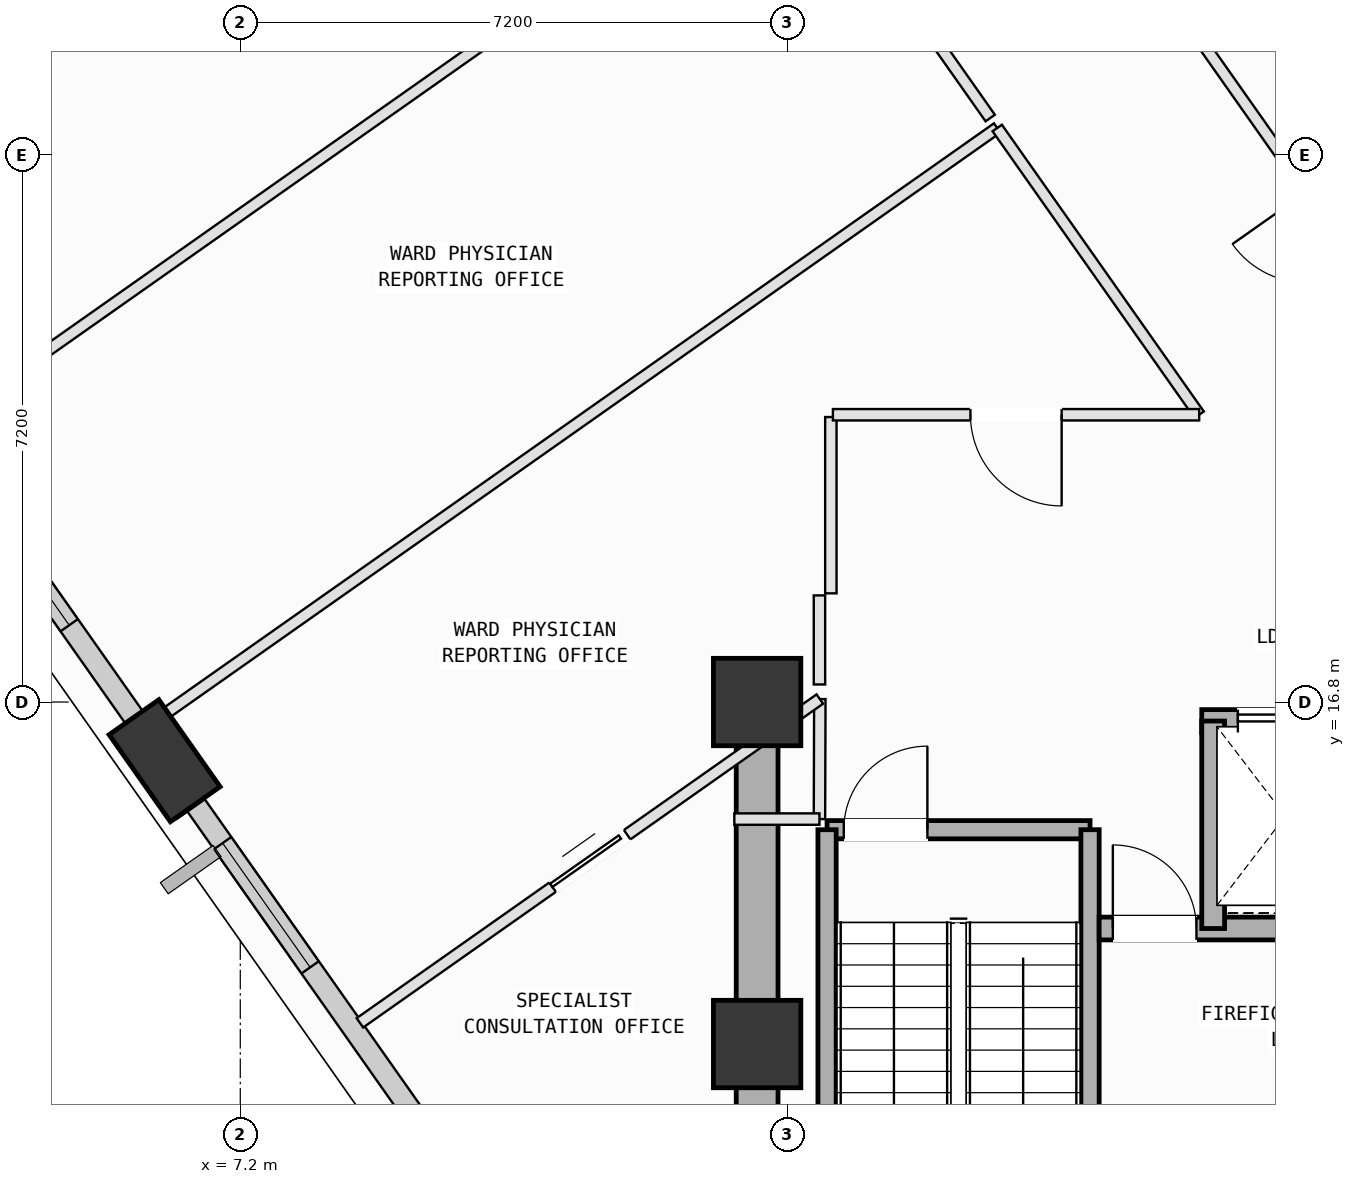
"""IFC4 building model, lengths in metres.
Left out: names, types, materials, properties, quantities, classifications, styles, units other than length and angle.
Written with IfcOpenShell. Run it as: python <this file> out.ifc"""

import sys

from ifc_helpers import new_model, si_unit, direction, frame, frame_2d, origin, origin_2d, place, context, subcontext, project, spatial, rectangle, extrude, element, fill, save


model = new_model("IFC4")
c1 = context("Model", 3, precision=1e-05, world=origin(), true_north=direction((0.0, 1.0)))
c2 = subcontext(c1, "Body", "Model", "MODEL_VIEW")
j1 = project(units=[si_unit("LENGTHUNIT", "METRE"), si_unit("PLANEANGLEUNIT", "RADIAN")], contexts=[c1])
p1 = place(None, origin())
s1 = spatial("IfcSite", under=j1, at=p1, CompositionType="ELEMENT")
p2 = place(p1, origin())
s2 = spatial("IfcBuilding", under=s1, at=p2, CompositionType="ELEMENT")
p3 = place(p2, frame((0.0, 0.0, 173.8)))
s3 = spatial("IfcBuildingStorey", under=s2, at=p3, CompositionType="ELEMENT", Elevation=173.8)
for number, where, z_axis, x_axis in (
    (1, (14.0, 12.3, 0.0), (0.0, 0.0, 1.0), (1.0, 0.0, 0.0)),
    (2, (14.0, 16.8, 0.0), (0.0, 0.0, 1.0), (1.0, 0.0, 0.0)),
):
    element("IfcColumn", number, at=place(p3, frame(where, z_axis=z_axis, x_axis=x_axis)), inside=s3, PredefinedType="COLUMN", context=c2, shape_type="SweptSolid", body=[
        extrude(rectangle(XDim=1.15, YDim=1.15, at=origin_2d()), origin(), (0.0, 0.0, 1.0), 4.0),
    ])
p4 = place(p3, frame((6.204, 16.028, 0.002), z_axis=(0.037064026692, -0.112465966428, 0.992964080076), x_axis=(-0.800913109409, 0.590900661619, 0.096822514295)))
e3 = element("IfcColumn", 3, at=p4, inside=s3, PredefinedType="COLUMN", context=c2, shape_type="SweptSolid", body=[
    extrude(rectangle(XDim=1.4, YDim=0.8, at=origin_2d()), origin(), (0.0, 0.0, 1.0), 4.025),
])
p5 = place(p3, frame((6.053, 16.243, 0.0), z_axis=(0.0, 0.0, 1.0), x_axis=(-0.575713674911, 0.817651371014, 0.0)))
e4 = element("IfcWall", 4, at=p5, inside=s3, PredefinedType="SOLIDWALL", context=c2, shape_type="SweptSolid", body=[
    extrude(rectangle(XDim=5.628, YDim=0.28, at=frame_2d((2.814, 0.0))), origin(), (0.0, 0.0, 1.0), 3.265),
])
p6 = place(p5, frame((1.917, 0.0, 0.75)))
e5 = element("IfcOpeningElement", 5, at=p6, cuts=e4, PredefinedType="OPENING", context=c2, shape_type="SweptSolid", body=[
    extrude(rectangle(XDim=1.6, YDim=1.95, at=frame_2d((0.8, 0.975))), frame((0.0, 0.15, 0.0), z_axis=(0.0, -1.0, 0.0), x_axis=(1.0, 0.0, 0.0)), (0.0, 0.0, 1.0), 0.3),
])
p7 = place(p3, frame((9.878, 10.81, 0.0), z_axis=(0.0, 0.0, 1.0), x_axis=(-0.575714474807, 0.817650807801, 0.0)))
e6 = element("IfcWall", 6, at=p7, inside=s3, PredefinedType="SOLIDWALL", context=c2, shape_type="SweptSolid", body=[
    extrude(rectangle(XDim=5.662, YDim=0.28, at=frame_2d((2.831, 0.0))), origin(), (0.0, 0.0, 1.0), 3.265),
])
p8 = place(p7, frame((3.056, 0.0, 0.75)))
e7 = element("IfcOpeningElement", 7, at=p8, cuts=e6, PredefinedType="OPENING", context=c2, shape_type="SweptSolid", body=[
    extrude(rectangle(XDim=2.0, YDim=1.95, at=frame_2d((1.0, 0.975))), frame((0.0, 0.15, 0.0), z_axis=(0.0, -1.0, 0.0), x_axis=(1.0, 0.0, 0.0)), (0.0, 0.0, 1.0), 0.3),
])
p9 = place(p3, frame((14.92, 15.12, 0.0), z_axis=(0.0, 0.0, 1.0), x_axis=(1.0, 0.0, 0.0)))
e8 = element("IfcWall", 8, at=p9, inside=s3, PredefinedType="SOLIDWALL", context=c2, shape_type="SweptSolid", body=[
    extrude(rectangle(XDim=3.46, YDim=0.24, at=frame_2d((1.73, 0.0))), origin(), (0.0, 0.0, 1.0), 3.78),
])
p10 = place(p9, frame((0.22, 0.0, 0.0)))
e9 = element("IfcOpeningElement", 9, at=p10, cuts=e8, PredefinedType="OPENING", context=c2, shape_type="SweptSolid", body=[
    extrude(rectangle(XDim=1.1, YDim=2.15, at=frame_2d((0.55, 1.075))), frame((0.0, 0.13, 0.0), z_axis=(0.0, -1.0, 0.0), x_axis=(1.0, 0.0, 0.0)), (0.0, 0.0, 1.0), 0.26),
])
for number, where, z_axis, x_axis in (
    (10, (18.38, 15.12, 0.0), (0.0, 0.0, 1.0), (0.0, -1.0, 0.0)),
    (11, (14.92, 8.075, 0.0), (0.0, 0.0, 1.0), (0.0, 1.0, 0.0)),
):
    element("IfcWall", number, at=place(p3, frame(where, z_axis=z_axis, x_axis=x_axis)), inside=s3, PredefinedType="SOLIDWALL", context=c2, shape_type="SweptSolid", body=[
        extrude(rectangle(XDim=7.045, YDim=0.24, at=frame_2d((3.522, 0.0))), origin(), (0.0, 0.0, 1.0), 3.78),
    ])
p11 = place(p3, frame((14.0, 16.8, 0.0), z_axis=(0.0, 0.0, 1.0), x_axis=(0.0, -1.0, 0.0)))
e12 = element("IfcWall", 12, at=p11, inside=s3, PredefinedType="SHEAR", context=c2, shape_type="SweptSolid", body=[
    extrude(rectangle(XDim=9.0, YDim=0.55, at=frame_2d((4.5, 0.0))), origin(), (0.0, 0.0, 1.0), 3.78),
])
p12 = place(p3, frame((19.85, 16.55, 0.0), z_axis=(0.0, 0.0, 1.0), x_axis=(1.0, 0.0, 0.0)))
e13 = element("IfcWall", 13, at=p12, inside=s3, PredefinedType="SOLIDWALL", context=c2, shape_type="SweptSolid", body=[
    extrude(rectangle(XDim=4.375, YDim=0.3, at=frame_2d((2.188, 0.0))), origin(), (0.0, 0.0, 1.0), 3.78),
])
p13 = place(p12, frame((0.475, 0.0, 0.0)))
e14 = element("IfcOpeningElement", 14, at=p13, cuts=e13, PredefinedType="OPENING", context=c2, shape_type="SweptSolid", body=[
    extrude(rectangle(XDim=1.25, YDim=2.18, at=frame_2d((0.625, 1.09))), frame((0.0, 0.16, 0.0), z_axis=(0.0, -1.0, 0.0), x_axis=(1.0, 0.0, 0.0)), (0.0, 0.0, 1.0), 0.32),
])
p14 = place(p12, frame((2.49, 0.0, 0.0)))
e15 = element("IfcOpeningElement", 15, at=p14, cuts=e13, PredefinedType="OPENING", context=c2, shape_type="SweptSolid", body=[
    extrude(rectangle(XDim=1.02, YDim=2.12, at=frame_2d((0.51, 1.06))), frame((0.0, 0.16, 0.0), z_axis=(0.0, -1.0, 0.0), x_axis=(1.0, 0.0, 0.0)), (0.0, 0.0, 1.0), 0.32),
])
p15 = place(p3, frame((18.5, 13.82, 0.0), z_axis=(0.0, 0.0, 1.0), x_axis=(1.0, 0.0, 0.0)))
e16 = element("IfcWall", 16, at=p15, inside=s3, PredefinedType="SOLIDWALL", context=c2, shape_type="SweptSolid", body=[
    extrude(rectangle(XDim=5.3, YDim=0.3, at=frame_2d((2.65, 0.0))), origin(), (0.0, 0.0, 1.0), 3.78),
])
p16 = place(p15, frame((0.18, 0.0, 0.0)))
e17 = element("IfcOpeningElement", 17, at=p16, cuts=e16, PredefinedType="OPENING", context=c2, shape_type="SweptSolid", body=[
    extrude(rectangle(XDim=1.1, YDim=2.15, at=frame_2d((0.55, 1.075))), frame((0.0, 0.16, 0.0), z_axis=(0.0, -1.0, 0.0), x_axis=(1.0, 0.0, 0.0)), (0.0, 0.0, 1.0), 0.32),
])
p17 = place(p3, frame((20.0, 13.82, 0.0), z_axis=(0.0, 0.0, 1.0), x_axis=(0.0, 1.0, 0.0)))
e18 = element("IfcWall", 18, at=p17, inside=s3, PredefinedType="SOLIDWALL", context=c2, shape_type="SweptSolid", body=[
    extrude(rectangle(XDim=2.73, YDim=0.3, at=frame_2d((1.365, 0.0))), origin(), (0.0, 0.0, 1.0), 3.78),
])
p18 = place(p3, frame((14.825, 16.839, 0.0), z_axis=(0.0, 0.0, 1.0), x_axis=(-0.003092131167, -0.999995219351, 0.0)))
e19 = element("IfcWall", 19, at=p18, inside=s3, PredefinedType="PARTITIONING", context=c2, shape_type="SweptSolid", body=[
    extrude(rectangle(XDim=1.579, YDim=0.15, at=frame_2d((0.79, 0.0))), origin(), (0.0, 0.0, 1.0), 3.78),
])
p19 = place(p3, frame((14.82, 15.26, 0.0), z_axis=(0.0, 0.0, 1.0), x_axis=(-1.0, 0.0, 0.0)))
e20 = element("IfcWall", 20, at=p19, inside=s3, PredefinedType="PARTITIONING", context=c2, shape_type="SweptSolid", body=[
    extrude(rectangle(XDim=1.12, YDim=0.15, at=frame_2d((0.56, 0.0))), origin(), (0.0, 0.0, 1.0), 3.78),
])
p20 = place(p3, frame((8.774, 12.579, 0.0), z_axis=(0.0, 0.0, 1.0), x_axis=(0.817686785851, 0.575663374069, 0.0)))
e21 = element("IfcWall", 21, at=p20, inside=s3, PredefinedType="PARTITIONING", context=c2, shape_type="SweptSolid", body=[
    extrude(rectangle(XDim=7.4, YDim=0.15, at=frame_2d((3.7, 0.0))), origin(), (0.0, 0.0, 1.0), 3.78),
])
p21 = place(p20, frame((3.1, 0.0, 0.0)))
e22 = element("IfcOpeningElement", 22, at=p21, cuts=e21, PredefinedType="OPENING", context=c2, shape_type="SweptSolid", body=[
    extrude(rectangle(XDim=1.2, YDim=2.15, at=frame_2d((0.6, 1.075))), frame((0.0, 0.085, 0.0), z_axis=(0.0, -1.0, 0.0), x_axis=(1.0, 0.0, 0.0)), (0.0, 0.0, 1.0), 0.17),
])
p22 = place(p3, frame((14.97, 20.55, 0.0), z_axis=(0.0, 0.0, 1.0), x_axis=(0.0, -1.0, 0.0)))
e23 = element("IfcWall", 23, at=p22, inside=s3, PredefinedType="PARTITIONING", context=c2, shape_type="SweptSolid", body=[
    extrude(rectangle(XDim=2.32, YDim=0.15, at=frame_2d((1.16, 0.0))), origin(), (0.0, 0.0, 1.0), 3.78),
])
p23 = place(p3, frame((14.82, 18.203, 0.0), z_axis=(0.0, 0.0, 1.0), x_axis=(0.0, -1.0, 0.0)))
e24 = element("IfcWall", 24, at=p23, inside=s3, PredefinedType="PARTITIONING", context=c2, shape_type="SweptSolid", body=[
    extrude(rectangle(XDim=1.172, YDim=0.15, at=frame_2d((0.586, 0.0))), origin(), (0.0, 0.0, 1.0), 3.78),
])
p24 = place(p3, frame((6.43, 15.308, 0.0), z_axis=(0.0, 0.0, 1.0), x_axis=(-0.575413328373, 0.817862764485, 0.0)))
e25 = element("IfcWall", 25, at=p24, inside=s3, PredefinedType="PARTITIONING", context=c2, shape_type="SweptSolid", body=[
    extrude(rectangle(XDim=0.982, YDim=0.15, at=frame_2d((0.491, 0.0))), origin(), (0.0, 0.0, 1.0), 3.265),
])
p25 = place(p3, frame((6.01, 16.504, 0.0), z_axis=(0.0, 0.0, 1.0), x_axis=(0.817682801661, 0.575669033272, 0.0)))
e26 = element("IfcWall", 26, at=p25, inside=s3, PredefinedType="PARTITIONING", context=c2, shape_type="SweptSolid", body=[
    extrude(rectangle(XDim=13.635, YDim=0.15, at=frame_2d((6.817, 0.0))), origin(), (0.0, 0.0, 1.0), 3.78),
])
p26 = place(p3, frame((17.159, 24.353, 0.0), z_axis=(0.0, 0.0, 1.0), x_axis=(0.575775132448, -0.817608094905, 0.0)))
e27 = element("IfcWall", 27, at=p26, inside=s3, PredefinedType="PARTITIONING", context=c2, shape_type="SweptSolid", body=[
    extrude(rectangle(XDim=4.615, YDim=0.15, at=frame_2d((2.307, 0.0))), origin(), (0.0, 0.0, 1.0), 3.78),
])
p27 = place(p3, frame((19.816, 20.58, 0.0), z_axis=(0.0, 0.0, 1.0), x_axis=(-1.0, 0.0, 0.0)))
e28 = element("IfcWall", 28, at=p27, inside=s3, PredefinedType="PARTITIONING", context=c2, shape_type="SweptSolid", body=[
    extrude(rectangle(XDim=4.819, YDim=0.15, at=frame_2d((2.409, 0.0))), origin(), (0.0, 0.0, 1.0), 3.78),
])
p28 = place(p27, frame((1.81, 0.0, 0.0)))
e29 = element("IfcOpeningElement", 29, at=p28, cuts=e28, PredefinedType="OPENING", context=c2, shape_type="SweptSolid", body=[
    extrude(rectangle(XDim=1.2, YDim=2.15, at=frame_2d((0.6, 1.075))), frame((0.0, 0.085, 0.0), z_axis=(0.0, -1.0, 0.0), x_axis=(1.0, 0.0, 0.0)), (0.0, 0.0, 1.0), 0.17),
])
p29 = place(p3, frame((3.247, 20.428, 0.0), z_axis=(0.0, 0.0, 1.0), x_axis=(0.817649087701, 0.575716917749, 0.0)))
e30 = element("IfcWall", 30, at=p29, inside=s3, PredefinedType="PARTITIONING", context=c2, shape_type="SweptSolid", body=[
    extrude(rectangle(XDim=13.635, YDim=0.15, at=frame_2d((6.818, 0.0))), origin(), (0.0, 0.0, 1.0), 3.78),
])
p30 = place(p3, frame((14.396, 28.278, 0.0), z_axis=(0.0, 0.0, 1.0), x_axis=(0.575625036634, -0.817713774618, 0.0)))
e31 = element("IfcWall", 31, at=p30, inside=s3, PredefinedType="PARTITIONING", context=c2, shape_type="SweptSolid", body=[
    extrude(rectangle(XDim=4.64, YDim=0.15, at=frame_2d((2.32, 0.0))), origin(), (0.0, 0.0, 1.0), 3.78),
])
p31 = place(p30, frame((1.72, 0.0, 0.0)))
e32 = element("IfcOpeningElement", 32, at=p31, cuts=e31, PredefinedType="OPENING", context=c2, shape_type="SweptSolid", body=[
    extrude(rectangle(XDim=1.2, YDim=2.15, at=frame_2d((0.6, 1.075))), frame((0.0, 0.085, 0.0), z_axis=(0.0, -1.0, 0.0), x_axis=(1.0, 0.0, 0.0)), (0.0, 0.0, 1.0), 0.17),
])
p32 = place(p3, frame((23.302, 20.58, 0.0), z_axis=(0.0, 0.0, 1.0), x_axis=(-0.575790528848, 0.817597252252, 0.0)))
e33 = element("IfcWall", 33, at=p32, inside=s3, PredefinedType="PARTITIONING", context=c2, shape_type="SweptSolid", body=[
    extrude(rectangle(XDim=5.983, YDim=0.15, at=frame_2d((2.992, 0.0))), origin(), (0.0, 0.0, 1.0), 3.78),
])
p33 = place(p32, frame((2.392, 0.0, 0.0)))
e34 = element("IfcOpeningElement", 34, at=p33, cuts=e33, PredefinedType="OPENING", context=c2, shape_type="SweptSolid", body=[
    extrude(rectangle(XDim=1.2, YDim=2.15, at=frame_2d((0.6, 1.075))), frame((0.0, 0.085, 0.0), z_axis=(0.0, -1.0, 0.0), x_axis=(1.0, 0.0, 0.0)), (0.0, 0.0, 1.0), 0.17),
])
p34 = place(p6, origin())
e35 = element("IfcWindow", 35, at=p34, inside=s3, PartitioningType="SINGLE_PANEL", PredefinedType="WINDOW", context=c2, shape_type="SweptSolid", body=[
    extrude(rectangle(XDim=1.6, YDim=1.95, at=frame_2d((0.8, 0.975))), frame((0.0, 0.03, 0.0), z_axis=(0.0, -1.0, 0.0), x_axis=(1.0, 0.0, 0.0)), (0.0, 0.0, 1.0), 0.06),
])
fill(e5, e35)
p35 = place(p8, origin())
e36 = element("IfcWindow", 36, at=p35, inside=s3, PartitioningType="SINGLE_PANEL", PredefinedType="WINDOW", context=c2, shape_type="SweptSolid", body=[
    extrude(rectangle(XDim=2.0, YDim=1.95, at=frame_2d((1.0, 0.975))), frame((0.0, 0.03, 0.0), z_axis=(0.0, -1.0, 0.0), x_axis=(1.0, 0.0, 0.0)), (0.0, 0.0, 1.0), 0.06),
])
fill(e7, e36)
p36 = place(p10, origin())
e37 = element("IfcDoor", 37, at=p36, inside=s3, OperationType="SINGLE_SWING_RIGHT", PredefinedType="DOOR", context=c2, shape_type="SweptSolid", body=[
    extrude(rectangle(XDim=1.1, YDim=2.15, at=frame_2d((0.55, 1.075))), frame((0.0, 0.025, 0.0), z_axis=(0.0, -1.0, 0.0), x_axis=(1.0, 0.0, 0.0)), (0.0, 0.0, 1.0), 0.05),
])
fill(e9, e37)
p37 = place(p16, origin())
e38 = element("IfcDoor", 38, at=p37, inside=s3, OperationType="SINGLE_SWING_LEFT", PredefinedType="DOOR", context=c2, shape_type="SweptSolid", body=[
    extrude(rectangle(XDim=1.1, YDim=2.15, at=frame_2d((0.55, 1.075))), frame((0.0, 0.025, 0.0), z_axis=(0.0, -1.0, 0.0), x_axis=(1.0, 0.0, 0.0)), (0.0, 0.0, 1.0), 0.05),
])
fill(e17, e38)
p38 = place(p13, origin())
e39 = element("IfcDoor", 39, at=p38, inside=s3, OperationType="DOUBLE_DOOR_SLIDING", PredefinedType="DOOR", context=c2, shape_type="SweptSolid", body=[
    extrude(rectangle(XDim=1.25, YDim=2.18, at=frame_2d((0.625, 1.09))), frame((0.0, 0.025, 0.0), z_axis=(0.0, -1.0, 0.0), x_axis=(1.0, 0.0, 0.0)), (0.0, 0.0, 1.0), 0.05),
])
fill(e14, e39)
p39 = place(p28, origin())
e40 = element("IfcDoor", 40, at=p39, inside=s3, OperationType="SINGLE_SWING_LEFT", PredefinedType="DOOR", context=c2, shape_type="SweptSolid", body=[
    extrude(rectangle(XDim=1.2, YDim=2.15, at=frame_2d((0.6, 1.075))), frame((0.0, 0.025, 0.0), z_axis=(0.0, -1.0, 0.0), x_axis=(1.0, 0.0, 0.0)), (0.0, 0.0, 1.0), 0.05),
])
fill(e29, e40)
p40 = place(p21, origin())
e41 = element("IfcDoor", 41, at=p40, inside=s3, OperationType="SLIDING_TO_LEFT", PredefinedType="DOOR", context=c2, shape_type="SweptSolid", body=[
    extrude(rectangle(XDim=1.2, YDim=2.15, at=frame_2d((0.6, 1.075))), frame((0.0, 0.025, 0.0), z_axis=(0.0, -1.0, 0.0), x_axis=(1.0, 0.0, 0.0)), (0.0, 0.0, 1.0), 0.05),
])
fill(e22, e41)
save(model, sys.argv[1])
